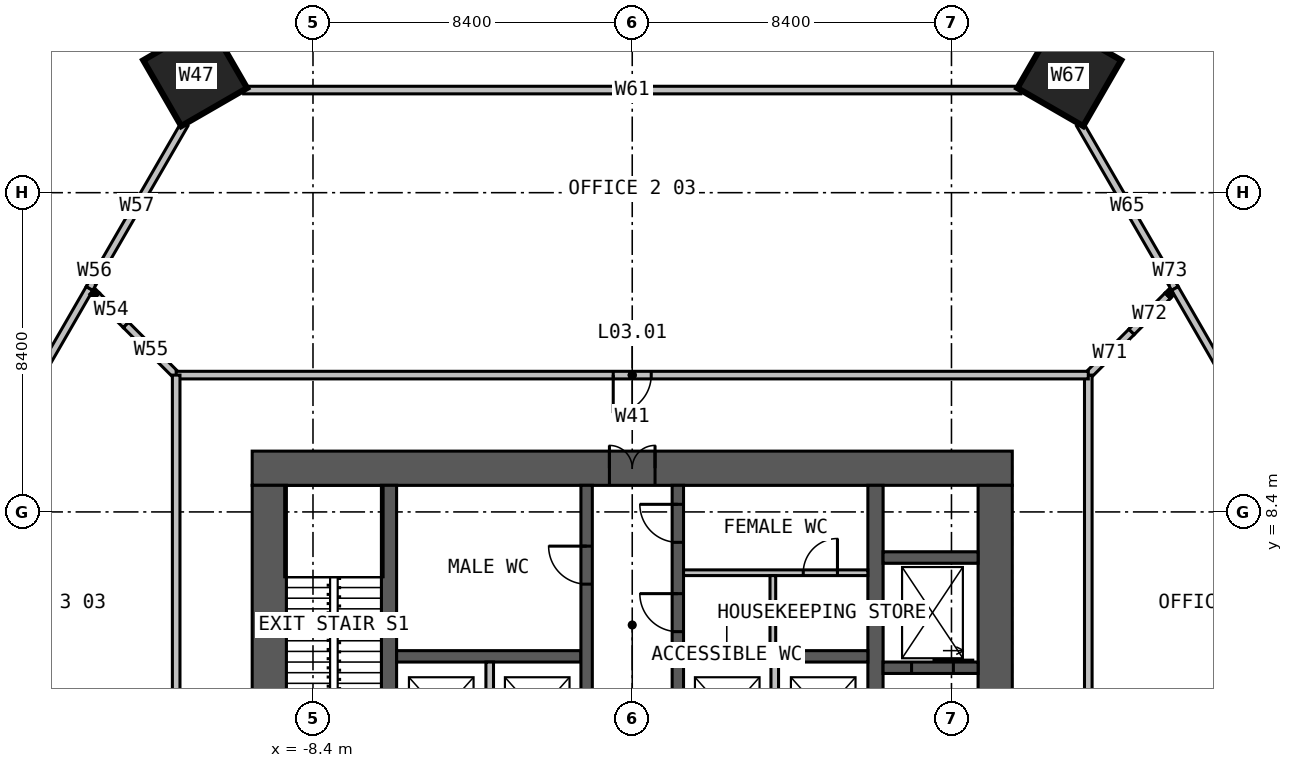
"""IFC4 building model, lengths in metres.
Left out: names, types, materials, properties, quantities, classifications, styles, units other than length and angle.
Written with IfcOpenShell. Run it as: python <this file> out.ifc"""

import sys

from ifc_helpers import new_model, si_unit, direction, frame, frame_2d, origin, origin_2d, place, context, subcontext, project, spatial, rectangle, hollow_rectangle, extrude, element, fill, save


model = new_model("IFC4")
c1 = context("Model", 3, precision=1e-05, world=origin(), true_north=direction((0.0, 1.0)))
c2 = subcontext(c1, "Body", "Model", "MODEL_VIEW")
j1 = project(units=[si_unit("LENGTHUNIT", "METRE"), si_unit("PLANEANGLEUNIT", "RADIAN")], contexts=[c1])
p1 = place(None, origin())
s1 = spatial("IfcSite", under=j1, at=p1, CompositionType="ELEMENT")
p2 = place(p1, origin())
s2 = spatial("IfcBuilding", under=s1, at=p2, CompositionType="ELEMENT")
p3 = place(p2, frame((0.0, 0.0, 16.0)))
s3 = spatial("IfcBuildingStorey", under=s2, at=p3, CompositionType="ELEMENT", Elevation=16.0)
for number, where, z_axis, x_axis in (
    (1, (11.5, 19.919, 0.0), (0.0, 0.0, 1.0), (0.5, 0.866, 0.0)),
    (2, (-11.5, 19.919, 0.0), (0.0, 0.0, 1.0), (-0.5, 0.866, 0.0)),
):
    element("IfcColumn", number, at=place(p3, frame(where, z_axis=z_axis, x_axis=x_axis)), inside=s3, PredefinedType="COLUMN", context=c2, shape_type="SweptSolid", body=[
        extrude(hollow_rectangle(XDim=2.0, YDim=2.0, WallThickness=0.24, at=origin_2d()), origin(), (0.0, 0.0, 1.0), 4.29),
    ])
p4 = place(p3, frame((-10.0, 9.55, 0.0), z_axis=(0.0, 0.0, 1.0), x_axis=(1.0, 0.0, 0.0)))
e3 = element("IfcWall", 3, at=p4, inside=s3, PredefinedType="SOLIDWALL", context=c2, shape_type="SweptSolid", body=[
    extrude(rectangle(XDim=20.0, YDim=0.9, at=frame_2d((10.0, 0.0))), origin(), (0.0, 0.0, 1.0), 5.0),
])
p5 = place(p4, frame((9.4, 0.0, 0.0)))
e4 = element("IfcOpeningElement", 4, at=p5, cuts=e3, PredefinedType="OPENING", context=c2, shape_type="SweptSolid", body=[
    extrude(rectangle(XDim=1.2, YDim=2.2, at=frame_2d((0.6, 1.1))), frame((0.0, 0.46, 0.0), z_axis=(0.0, -1.0, 0.0), x_axis=(1.0, 0.0, 0.0)), (0.0, 0.0, 1.0), 0.92),
])
for number, where, z_axis, x_axis in (
    (5, (9.55, -9.1, 0.0), (0.0, 0.0, 1.0), (0.0, 1.0, 0.0)),
    (6, (-9.55, 9.1, 0.0), (0.0, 0.0, 1.0), (0.0, -1.0, 0.0)),
):
    element("IfcWall", number, at=place(p3, frame(where, z_axis=z_axis, x_axis=x_axis)), inside=s3, PredefinedType="SOLIDWALL", context=c2, shape_type="SweptSolid", body=[
        extrude(rectangle(XDim=18.2, YDim=0.9, at=frame_2d((9.1, 0.0))), origin(), (0.0, 0.0, 1.0), 5.0),
    ])
p6 = place(p3, frame((-6.4, -9.1, 0.0), z_axis=(0.0, 0.0, 1.0), x_axis=(0.0, 1.0, 0.0)))
e7 = element("IfcWall", 7, at=p6, inside=s3, PredefinedType="SOLIDWALL", context=c2, shape_type="SweptSolid", body=[
    extrude(rectangle(XDim=18.2, YDim=0.4, at=frame_2d((9.1, 0.0))), origin(), (0.0, 0.0, 1.0), 5.0),
])
p7 = place(p6, frame((8.6, 0.0, 0.0)))
e8 = element("IfcOpeningElement", 8, at=p7, cuts=e7, PredefinedType="OPENING", context=c2, shape_type="SweptSolid", body=[
    extrude(rectangle(XDim=1.0, YDim=2.2, at=frame_2d((0.5, 1.1))), frame((0.0, 0.21, 0.0), z_axis=(0.0, -1.0, 0.0), x_axis=(1.0, 0.0, 0.0)), (0.0, 0.0, 1.0), 0.42),
])
p8 = place(p3, frame((6.4, 9.1, 0.0), z_axis=(0.0, 0.0, 1.0), x_axis=(0.0, -1.0, 0.0)))
e9 = element("IfcWall", 9, at=p8, inside=s3, PredefinedType="SOLIDWALL", context=c2, shape_type="SweptSolid", body=[
    extrude(rectangle(XDim=18.2, YDim=0.4, at=frame_2d((9.1, 0.0))), origin(), (0.0, 0.0, 1.0), 5.0),
])
p9 = place(p8, frame((8.6, 0.0, 0.0)))
e10 = element("IfcOpeningElement", 10, at=p9, cuts=e9, PredefinedType="OPENING", context=c2, shape_type="SweptSolid", body=[
    extrude(rectangle(XDim=1.0, YDim=2.2, at=frame_2d((0.5, 1.1))), frame((0.0, 0.21, 0.0), z_axis=(0.0, -1.0, 0.0), x_axis=(1.0, 0.0, 0.0)), (0.0, 0.0, 1.0), 0.42),
])
for number, where, z_axis, x_axis in (
    (11, (-6.2, 4.6, 0.0), (0.0, 0.0, 1.0), (1.0, 0.0, 0.0)),
    (12, (1.35, 4.6, 0.0), (0.0, 0.0, 1.0), (1.0, 0.0, 0.0)),
):
    element("IfcWall", number, at=place(p3, frame(where, z_axis=z_axis, x_axis=x_axis)), inside=s3, PredefinedType="SOLIDWALL", context=c2, shape_type="SweptSolid", body=[
        extrude(rectangle(XDim=4.85, YDim=0.3, at=frame_2d((2.425, 0.0))), origin(), (0.0, 0.0, 1.0), 5.0),
    ])
p10 = place(p3, frame((-1.2, 1.45, 0.0), z_axis=(0.0, 0.0, 1.0), x_axis=(0.0, 1.0, 0.0)))
e13 = element("IfcWall", 13, at=p10, inside=s3, PredefinedType="SOLIDWALL", context=c2, shape_type="SweptSolid", body=[
    extrude(rectangle(XDim=7.65, YDim=0.3, at=frame_2d((3.825, 0.0))), origin(), (0.0, 0.0, 1.0), 5.0),
])
p11 = place(p10, frame((5.05, 0.0, 0.0)))
e14 = element("IfcOpeningElement", 14, at=p11, cuts=e13, PredefinedType="OPENING", context=c2, shape_type="SweptSolid", body=[
    extrude(rectangle(XDim=1.0, YDim=2.2, at=frame_2d((0.5, 1.1))), frame((0.0, 0.16, 0.0), z_axis=(0.0, -1.0, 0.0), x_axis=(1.0, 0.0, 0.0)), (0.0, 0.0, 1.0), 0.32),
])
p12 = place(p3, frame((1.2, 1.45, 0.0), z_axis=(0.0, 0.0, 1.0), x_axis=(0.0, 1.0, 0.0)))
e15 = element("IfcWall", 15, at=p12, inside=s3, PredefinedType="SOLIDWALL", context=c2, shape_type="SweptSolid", body=[
    extrude(rectangle(XDim=7.65, YDim=0.3, at=frame_2d((3.825, 0.0))), origin(), (0.0, 0.0, 1.0), 5.0),
])
p13 = place(p12, frame((3.8, 0.0, 0.0)))
e16 = element("IfcOpeningElement", 16, at=p13, cuts=e15, PredefinedType="OPENING", context=c2, shape_type="SweptSolid", body=[
    extrude(rectangle(XDim=1.0, YDim=2.2, at=frame_2d((0.5, 1.1))), frame((0.0, 0.16, 0.0), z_axis=(0.0, -1.0, 0.0), x_axis=(1.0, 0.0, 0.0)), (0.0, 0.0, 1.0), 0.32),
])
p14 = place(p12, frame((6.15, 0.0, 0.0)))
e17 = element("IfcOpeningElement", 17, at=p14, cuts=e15, PredefinedType="OPENING", context=c2, shape_type="SweptSolid", body=[
    extrude(rectangle(XDim=1.0, YDim=2.2, at=frame_2d((0.5, 1.1))), frame((0.0, 0.16, 0.0), z_axis=(0.0, -1.0, 0.0), x_axis=(1.0, 0.0, 0.0)), (0.0, 0.0, 1.0), 0.32),
])
p15 = place(p3, frame((6.6, 4.3, 0.0), z_axis=(0.0, 0.0, 1.0), x_axis=(1.0, 0.0, 0.0)))
e18 = element("IfcWall", 18, at=p15, inside=s3, PredefinedType="SOLIDWALL", context=c2, shape_type="SweptSolid", body=[
    extrude(rectangle(XDim=2.5, YDim=0.3, at=frame_2d((1.25, 0.0))), origin(), (0.0, 0.0, 1.0), 5.0),
])
p16 = place(p15, frame((0.75, 0.0, 0.0)))
e19 = element("IfcOpeningElement", 19, at=p16, cuts=e18, PredefinedType="OPENING", context=c2, shape_type="SweptSolid", body=[
    extrude(rectangle(XDim=1.1, YDim=2.2, at=frame_2d((0.55, 1.1))), frame((0.0, 0.16, 0.0), z_axis=(0.0, -1.0, 0.0), x_axis=(1.0, 0.0, 0.0)), (0.0, 0.0, 1.0), 0.32),
])
p17 = place(p3, frame((6.6, 7.2, 0.0), z_axis=(0.0, 0.0, 1.0), x_axis=(1.0, 0.0, 0.0)))
e20 = element("IfcWall", 20, at=p17, inside=s3, PredefinedType="SOLIDWALL", context=c2, shape_type="SweptSolid", body=[
    extrude(rectangle(XDim=2.5, YDim=0.3, at=frame_2d((1.25, 0.0))), origin(), (0.0, 0.0, 1.0), 5.0),
])
for number, where, z_axis, x_axis in (
    (21, (-3.75, 1.75, 0.0), (0.0, 0.0, 1.0), (0.0, 1.0, 0.0)),
    (22, (3.75, 1.75, 0.0), (0.0, 0.0, 1.0), (0.0, 1.0, 0.0)),
):
    element("IfcWall", number, at=place(p3, frame(where, z_axis=z_axis, x_axis=x_axis)), inside=s3, PredefinedType="SOLIDWALL", context=c2, shape_type="SweptSolid", body=[
        extrude(rectangle(XDim=2.7, YDim=0.2, at=frame_2d((1.35, 0.0))), origin(), (0.0, 0.0, 1.0), 4.75),
    ])
p18 = place(p3, frame((1.35, 6.8, 0.0), z_axis=(0.0, 0.0, 1.0), x_axis=(1.0, 0.0, 0.0)))
e23 = element("IfcWall", 23, at=p18, inside=s3, PredefinedType="PARTITIONING", context=c2, shape_type="SweptSolid", body=[
    extrude(rectangle(XDim=4.85, YDim=0.15, at=frame_2d((2.425, 0.0))), origin(), (0.0, 0.0, 1.0), 4.75),
])
p19 = place(p18, frame((3.15, 0.0, 0.0)))
e24 = element("IfcOpeningElement", 24, at=p19, cuts=e23, PredefinedType="OPENING", context=c2, shape_type="SweptSolid", body=[
    extrude(rectangle(XDim=0.9, YDim=2.2, at=frame_2d((0.45, 1.1))), frame((0.0, 0.085, 0.0), z_axis=(0.0, -1.0, 0.0), x_axis=(1.0, 0.0, 0.0)), (0.0, 0.0, 1.0), 0.17),
])
p20 = place(p3, frame((3.7, 4.75, 0.0), z_axis=(0.0, 0.0, 1.0), x_axis=(0.0, 1.0, 0.0)))
e25 = element("IfcWall", 25, at=p20, inside=s3, PredefinedType="PARTITIONING", context=c2, shape_type="SweptSolid", body=[
    extrude(rectangle(XDim=1.975, YDim=0.15, at=frame_2d((0.988, 0.0))), origin(), (0.0, 0.0, 1.0), 4.75),
])
p21 = place(p3, frame((-22.0, 0.901, 0.0), z_axis=(0.0, 0.0, 1.0), x_axis=(0.499789042554, 0.866147165869, 0.0)))
e26 = element("IfcWall", 26, at=p21, inside=s3, PredefinedType="PARTITIONING", context=c2, shape_type="SweptSolid", body=[
    extrude(rectangle(XDim=15.447, YDim=0.2, at=frame_2d((7.723, 0.0))), origin(), (0.0, 0.0, 1.0), 1.89),
])
p22 = place(p3, frame((-17.76, 30.76, 0.0), z_axis=(0.0, 0.0, 1.0), x_axis=(0.499954853145, -0.866051467764, 0.0)))
e27 = element("IfcWall", 27, at=p22, inside=s3, PredefinedType="PARTITIONING", context=c2, shape_type="SweptSolid", body=[
    extrude(rectangle(XDim=12.277, YDim=0.2, at=frame_2d((6.138, 0.0))), origin(), (0.0, 0.0, 1.0), 4.7),
])
p23 = place(p3, frame((-11.62, 20.124, 0.0), z_axis=(0.0, 0.0, 1.0), x_axis=(0.500070134591, -0.865984907773, 0.0)))
e28 = element("IfcWall", 28, at=p23, inside=s3, PredefinedType="PARTITIONING", context=c2, shape_type="SweptSolid", body=[
    extrude(rectangle(XDim=0.608, YDim=0.2, at=frame_2d((0.304, 0.0))), origin(), (0.0, 0.0, 1.0), 1.89),
])
p24 = place(p3, frame((-14.091, 14.091, 0.0), z_axis=(0.0, 0.0, 1.0), x_axis=(0.707106781187, -0.707106781187, 0.0)))
e29 = element("IfcWall", 29, at=p24, inside=s3, PredefinedType="PARTITIONING", context=c2, shape_type="SweptSolid", body=[
    extrude(rectangle(XDim=1.09, YDim=0.2, at=frame_2d((0.545, 0.0))), origin(), (0.0, 0.0, 1.0), 4.7),
])
p25 = place(p3, frame((-13.32, 13.32, 0.0), z_axis=(0.0, 0.0, 1.0), x_axis=(0.707106781187, -0.707106781187, 0.0)))
e30 = element("IfcWall", 30, at=p25, inside=s3, PredefinedType="PARTITIONING", context=c2, shape_type="SweptSolid", body=[
    extrude(rectangle(XDim=1.866, YDim=0.2, at=frame_2d((0.933, 0.0))), origin(), (0.0, 0.0, 1.0), 3.79),
])
p26 = place(p3, frame((-14.201, 14.201, 0.0), z_axis=(0.0, 0.0, 1.0), x_axis=(0.707106781187, -0.707106781187, 0.0)))
e31 = element("IfcWall", 31, at=p26, inside=s3, PredefinedType="PARTITIONING", context=c2, shape_type="SweptSolid", body=[
    extrude(rectangle(XDim=0.155, YDim=0.2, at=frame_2d((0.078, 0.0))), origin(), (0.0, 0.0, 1.0), 1.89),
])
p27 = place(p3, frame((-14.28, 14.28, 0.0), z_axis=(0.0, 0.0, 1.0), x_axis=(0.500785735381, 0.865571283742, 0.0)))
e32 = element("IfcWall", 32, at=p27, inside=s3, PredefinedType="PARTITIONING", context=c2, shape_type="SweptSolid", body=[
    extrude(rectangle(XDim=4.994, YDim=0.2, at=frame_2d((2.497, 0.0))), origin(), (0.0, 0.0, 1.0), 1.89),
])
p28 = place(p3, frame((-10.225, 19.5, 0.0), z_axis=(0.0, 0.0, 1.0), x_axis=(1.0, 0.0, 0.0)))
e33 = element("IfcWall", 33, at=p28, inside=s3, PredefinedType="PARTITIONING", context=c2, shape_type="SweptSolid", body=[
    extrude(rectangle(XDim=20.45, YDim=0.2, at=frame_2d((10.225, 0.0))), origin(), (0.0, 0.0, 1.0), 1.89),
])
p29 = place(p3, frame((11.779, 18.603, 0.0), z_axis=(0.0, 0.0, 1.0), x_axis=(0.500785735381, -0.865571283742, 0.0)))
e34 = element("IfcWall", 34, at=p29, inside=s3, PredefinedType="PARTITIONING", context=c2, shape_type="SweptSolid", body=[
    extrude(rectangle(XDim=4.994, YDim=0.2, at=frame_2d((2.497, 0.0))), origin(), (0.0, 0.0, 1.0), 1.89),
])
p30 = place(p3, frame((11.622, 20.128, 0.0), z_axis=(0.0, 0.0, 1.0), x_axis=(0.499954853145, 0.866051467764, 0.0)))
e35 = element("IfcWall", 35, at=p30, inside=s3, PredefinedType="PARTITIONING", context=c2, shape_type="SweptSolid", body=[
    extrude(rectangle(XDim=12.277, YDim=0.2, at=frame_2d((6.138, 0.0))), origin(), (0.0, 0.0, 1.0), 4.7),
])
p31 = place(p30, frame((5.276, 0.0, 0.0)))
e36 = element("IfcOpeningElement", 36, at=p31, cuts=e35, PredefinedType="OPENING", context=c2, shape_type="SweptSolid", body=[
    extrude(rectangle(XDim=1.0, YDim=2.2, at=frame_2d((0.5, 1.1))), frame((0.0, 0.11, 0.0), z_axis=(0.0, -1.0, 0.0), x_axis=(1.0, 0.0, 0.0)), (0.0, 0.0, 1.0), 0.22),
])
p32 = place(p3, frame((11.316, 19.597, 0.0), z_axis=(0.0, 0.0, 1.0), x_axis=(0.500070134591, 0.865984907773, 0.0)))
e37 = element("IfcWall", 37, at=p32, inside=s3, PredefinedType="PARTITIONING", context=c2, shape_type="SweptSolid", body=[
    extrude(rectangle(XDim=0.608, YDim=0.2, at=frame_2d((0.304, 0.0))), origin(), (0.0, 0.0, 1.0), 1.89),
])
p33 = place(p3, frame((12.0, 12.0, 0.0), z_axis=(0.0, 0.0, 1.0), x_axis=(0.707106781187, 0.707106781187, 0.0)))
e38 = element("IfcWall", 38, at=p33, inside=s3, PredefinedType="PARTITIONING", context=c2, shape_type="SweptSolid", body=[
    extrude(rectangle(XDim=1.61, YDim=0.2, at=frame_2d((0.805, 0.0))), origin(), (0.0, 0.0, 1.0), 3.79),
])
p34 = place(p3, frame((13.139, 13.139, 0.0), z_axis=(0.0, 0.0, 1.0), x_axis=(0.707106781187, 0.707106781187, 0.0)))
e39 = element("IfcWall", 39, at=p34, inside=s3, PredefinedType="PARTITIONING", context=c2, shape_type="SweptSolid", body=[
    extrude(rectangle(XDim=1.346, YDim=0.2, at=frame_2d((0.673, 0.0))), origin(), (0.0, 0.0, 1.0), 4.7),
])
p35 = place(p3, frame((14.091, 14.091, 0.0), z_axis=(0.0, 0.0, 1.0), x_axis=(0.707106781187, 0.707106781187, 0.0)))
e40 = element("IfcWall", 40, at=p35, inside=s3, PredefinedType="PARTITIONING", context=c2, shape_type="SweptSolid", body=[
    extrude(rectangle(XDim=0.155, YDim=0.2, at=frame_2d((0.078, 0.0))), origin(), (0.0, 0.0, 1.0), 1.89),
])
p36 = place(p3, frame((14.28, 14.28, 0.0), z_axis=(0.0, 0.0, 1.0), x_axis=(0.499789042554, -0.866147165869, 0.0)))
e41 = element("IfcWall", 41, at=p36, inside=s3, PredefinedType="PARTITIONING", context=c2, shape_type="SweptSolid", body=[
    extrude(rectangle(XDim=15.447, YDim=0.2, at=frame_2d((7.723, 0.0))), origin(), (0.0, 0.0, 1.0), 1.89),
])
p37 = place(p3, frame((12.0, -12.0, 0.0), z_axis=(0.0, 0.0, 1.0), x_axis=(0.0, 1.0, 0.0)))
e42 = element("IfcWall", 42, at=p37, inside=s3, PredefinedType="PARTITIONING", context=c2, shape_type="SweptSolid", body=[
    extrude(rectangle(XDim=24.0, YDim=0.2, at=frame_2d((12.0, 0.0))), origin(), (0.0, 0.0, 1.0), 4.7),
])
p38 = place(p3, frame((12.0, 12.0, 0.0), z_axis=(0.0, 0.0, 1.0), x_axis=(-1.0, 0.0, 0.0)))
e43 = element("IfcWall", 43, at=p38, inside=s3, PredefinedType="PARTITIONING", context=c2, shape_type="SweptSolid", body=[
    extrude(rectangle(XDim=24.0, YDim=0.2, at=frame_2d((12.0, 0.0))), origin(), (0.0, 0.0, 1.0), 4.7),
])
p39 = place(p38, frame((11.5, 0.0, 0.0)))
e44 = element("IfcOpeningElement", 44, at=p39, cuts=e43, PredefinedType="OPENING", context=c2, shape_type="SweptSolid", body=[
    extrude(rectangle(XDim=1.0, YDim=2.2, at=frame_2d((0.5, 1.1))), frame((0.0, 0.11, 0.0), z_axis=(0.0, -1.0, 0.0), x_axis=(1.0, 0.0, 0.0)), (0.0, 0.0, 1.0), 0.22),
])
p40 = place(p3, frame((-12.0, 12.0, 0.0), z_axis=(0.0, 0.0, 1.0), x_axis=(0.0, -1.0, 0.0)))
e45 = element("IfcWall", 45, at=p40, inside=s3, PredefinedType="PARTITIONING", context=c2, shape_type="SweptSolid", body=[
    extrude(rectangle(XDim=24.0, YDim=0.2, at=frame_2d((12.0, 0.0))), origin(), (0.0, 0.0, 1.0), 4.7),
])
p41 = place(p5, origin())
e46 = element("IfcDoor", 46, at=p41, inside=s3, OperationType="DOUBLE_DOOR_SINGLE_SWING", PredefinedType="DOOR", context=c2, shape_type="SweptSolid", body=[
    extrude(rectangle(XDim=1.2, YDim=2.2, at=frame_2d((0.6, 1.1))), frame((0.0, 0.025, 0.0), z_axis=(0.0, -1.0, 0.0), x_axis=(1.0, 0.0, 0.0)), (0.0, 0.0, 1.0), 0.05),
])
fill(e4, e46)
p42 = place(p11, origin())
e47 = element("IfcDoor", 47, at=p42, inside=s3, OperationType="SINGLE_SWING_RIGHT", PredefinedType="DOOR", context=c2, shape_type="SweptSolid", body=[
    extrude(rectangle(XDim=1.0, YDim=2.2, at=frame_2d((0.5, 1.1))), frame((0.0, 0.025, 0.0), z_axis=(0.0, -1.0, 0.0), x_axis=(1.0, 0.0, 0.0)), (0.0, 0.0, 1.0), 0.05),
])
fill(e14, e47)
p43 = place(p13, origin())
e48 = element("IfcDoor", 48, at=p43, inside=s3, OperationType="SINGLE_SWING_RIGHT", PredefinedType="DOOR", context=c2, shape_type="SweptSolid", body=[
    extrude(rectangle(XDim=1.0, YDim=2.2, at=frame_2d((0.5, 1.1))), frame((0.0, 0.025, 0.0), z_axis=(0.0, -1.0, 0.0), x_axis=(1.0, 0.0, 0.0)), (0.0, 0.0, 1.0), 0.05),
])
fill(e16, e48)
p44 = place(p14, origin())
e49 = element("IfcDoor", 49, at=p44, inside=s3, OperationType="SINGLE_SWING_RIGHT", PredefinedType="DOOR", context=c2, shape_type="SweptSolid", body=[
    extrude(rectangle(XDim=1.0, YDim=2.2, at=frame_2d((0.5, 1.1))), frame((0.0, 0.025, 0.0), z_axis=(0.0, -1.0, 0.0), x_axis=(1.0, 0.0, 0.0)), (0.0, 0.0, 1.0), 0.05),
])
fill(e17, e49)
p45 = place(p19, origin())
e50 = element("IfcDoor", 50, at=p45, inside=s3, OperationType="SINGLE_SWING_RIGHT", PredefinedType="DOOR", context=c2, shape_type="SweptSolid", body=[
    extrude(rectangle(XDim=0.9, YDim=2.2, at=frame_2d((0.45, 1.1))), frame((0.0, 0.025, 0.0), z_axis=(0.0, -1.0, 0.0), x_axis=(1.0, 0.0, 0.0)), (0.0, 0.0, 1.0), 0.05),
])
fill(e24, e50)
p46 = place(p16, origin())
e51 = element("IfcDoor", 51, at=p46, inside=s3, OperationType="SLIDING_TO_LEFT", PredefinedType="DOOR", context=c2, shape_type="SweptSolid", body=[
    extrude(rectangle(XDim=1.1, YDim=2.2, at=frame_2d((0.55, 1.1))), frame((0.0, 0.025, 0.0), z_axis=(0.0, -1.0, 0.0), x_axis=(1.0, 0.0, 0.0)), (0.0, 0.0, 1.0), 0.05),
])
fill(e19, e51)
p47 = place(p39, origin())
e52 = element("IfcDoor", 52, at=p47, inside=s3, OperationType="SINGLE_SWING_RIGHT", PredefinedType="DOOR", context=c2, shape_type="SweptSolid", body=[
    extrude(rectangle(XDim=1.0, YDim=2.2, at=frame_2d((0.5, 1.1))), frame((0.0, 0.025, 0.0), z_axis=(0.0, -1.0, 0.0), x_axis=(1.0, 0.0, 0.0)), (0.0, 0.0, 1.0), 0.05),
])
fill(e44, e52)
save(model, sys.argv[1])
